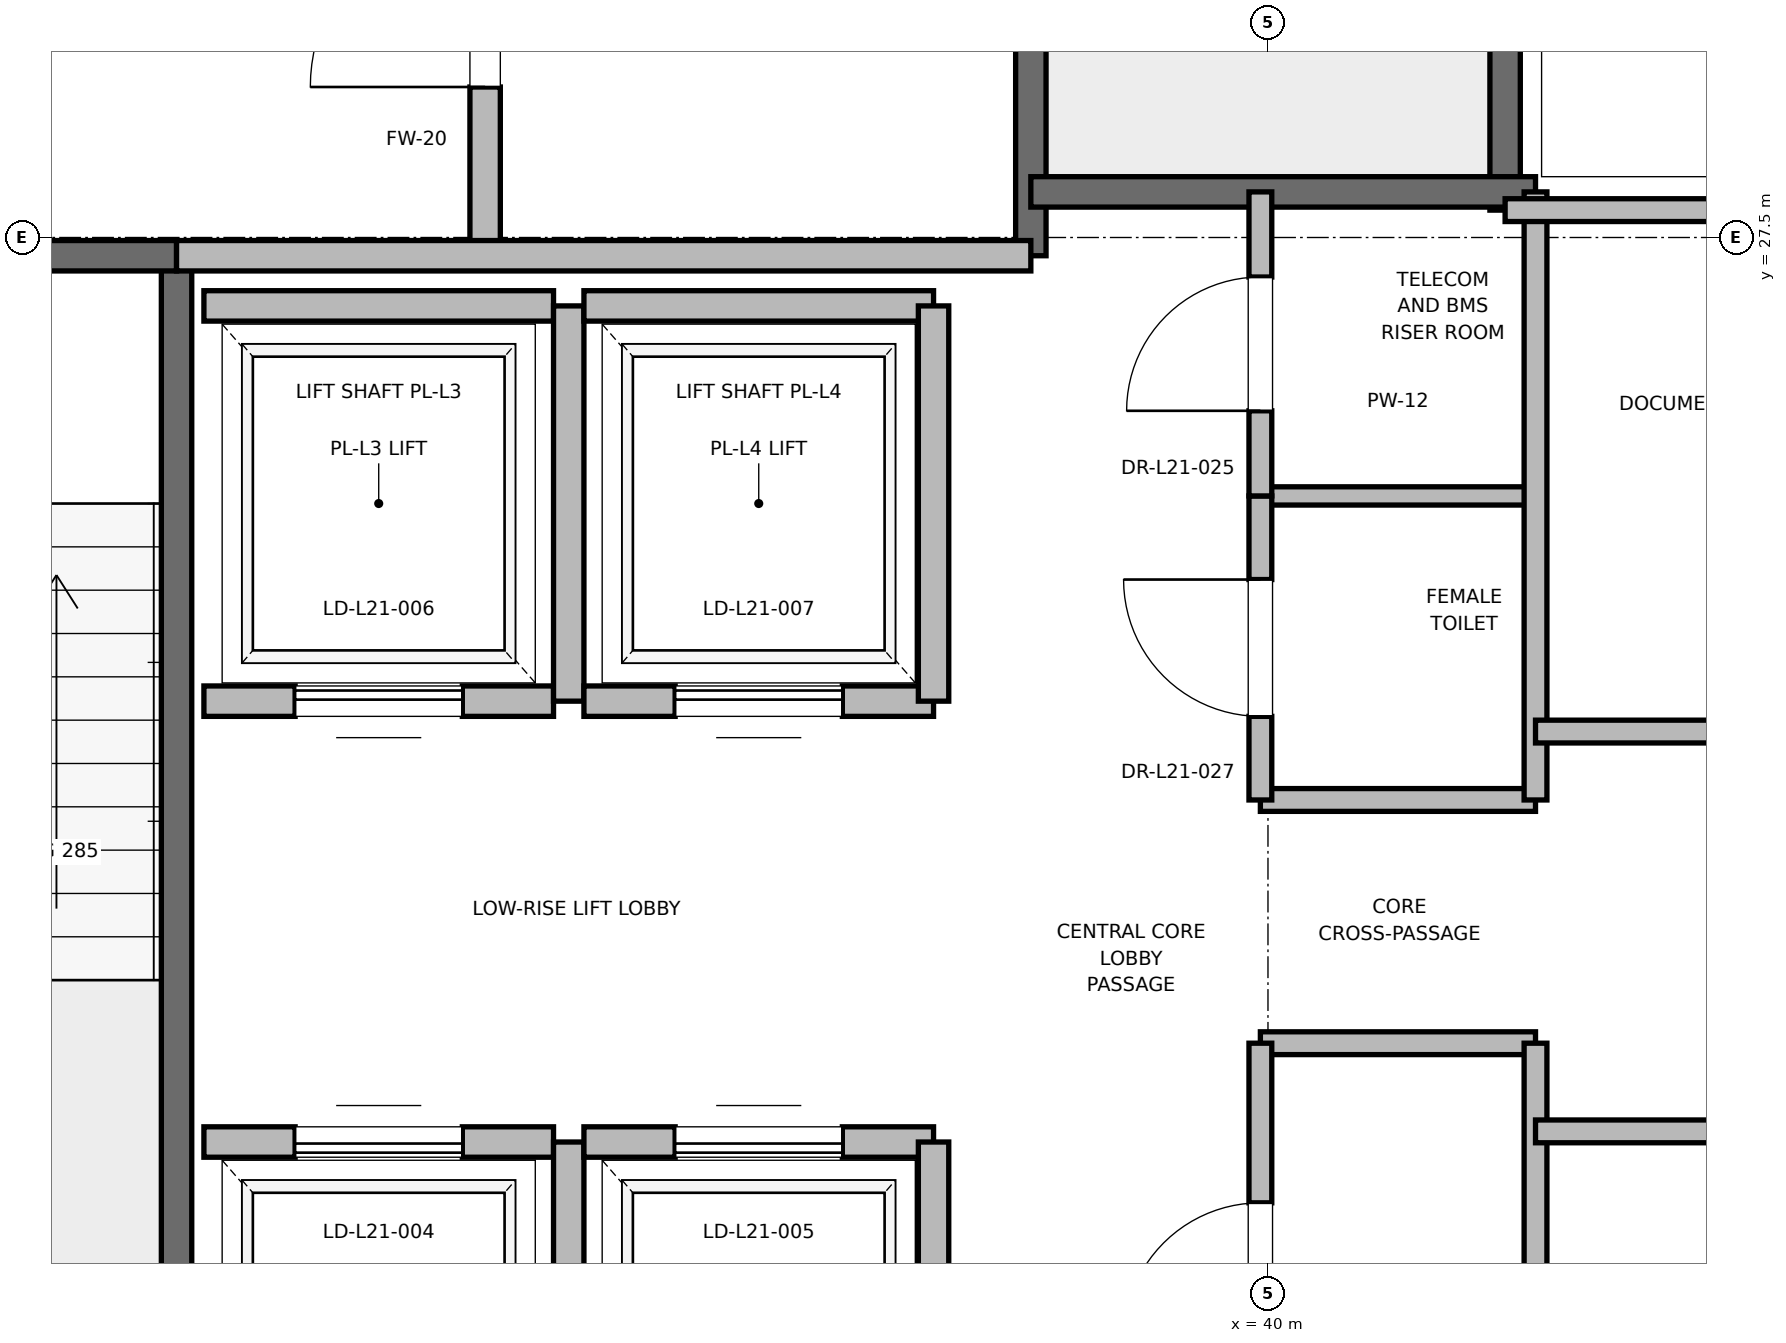
"""IFC4 building model, lengths in metres.
Left out: names, types, materials, properties, quantities, classifications, styles, units other than length and angle.
Written with IfcOpenShell. Run it as: python <this file> out.ifc"""

import sys

from ifc_helpers import new_model, si_unit, direction, frame, frame_2d, origin, place, context, subcontext, project, spatial, rectangle, extrude, element, fill, save


model = new_model("IFC4")
c1 = context("Model", 3, precision=1e-05, world=origin(), true_north=direction((0.0, 1.0)))
c2 = subcontext(c1, "Body", "Model", "MODEL_VIEW")
j1 = project(units=[si_unit("LENGTHUNIT", "METRE"), si_unit("PLANEANGLEUNIT", "RADIAN")], contexts=[c1])
p1 = place(None, origin())
s1 = spatial("IfcSite", under=j1, at=p1, CompositionType="ELEMENT")
p2 = place(p1, origin())
s2 = spatial("IfcBuilding", under=s1, at=p2, CompositionType="ELEMENT")
p3 = place(p2, frame((0.0, 0.0, 91.6)))
s3 = spatial("IfcBuildingStorey", under=s2, at=p3, CompositionType="ELEMENT", Elevation=91.6)
p4 = place(p3, frame((32.82, 18.6, 0.0), z_axis=(0.0, 0.0, 1.0), x_axis=(0.0, 1.0, 0.0)))
e1 = element("IfcWall", 1, at=p4, inside=s3, PredefinedType="SOLIDWALL", context=c2, shape_type="SweptSolid", body=[
    extrude(rectangle(XDim=8.78, YDim=0.2, at=frame_2d((4.39, 0.0))), origin(), (0.0, 0.0, 1.0), 3.76),
])
p5 = place(p3, frame((29.7, 27.38, 0.0), z_axis=(0.0, 0.0, 1.0), x_axis=(1.0, 0.0, 0.0)))
e2 = element("IfcWall", 2, at=p5, inside=s3, PredefinedType="SOLIDWALL", context=c2, shape_type="SweptSolid", body=[
    extrude(rectangle(XDim=3.12, YDim=0.2, at=frame_2d((1.56, 0.0))), origin(), (0.0, 0.0, 1.0), 3.76),
])
p6 = place(p5, frame((1.01, 0.0, 0.0)))
e3 = element("IfcOpeningElement", 3, at=p6, cuts=e2, PredefinedType="OPENING", context=c2, shape_type="SweptSolid", body=[
    extrude(rectangle(XDim=1.1, YDim=2.15, at=frame_2d((0.55, 1.075))), frame((0.0, 0.1, 0.0), z_axis=(0.0, -1.0, 0.0), x_axis=(1.0, 0.0, 0.0)), (0.0, 0.0, 1.0), 0.2),
])
p7 = place(p3, frame((38.44, 27.38, 0.0), z_axis=(0.0, 0.0, 1.0), x_axis=(0.0, 1.0, 0.0)))
e4 = element("IfcWall", 4, at=p7, inside=s3, PredefinedType="SOLIDWALL", context=c2, shape_type="SweptSolid", body=[
    extrude(rectangle(XDim=8.87, YDim=0.2, at=frame_2d((4.435, 0.0))), origin(), (0.0, 0.0, 1.0), 3.76),
])
p8 = place(p3, frame((41.56, 27.68, 0.0), z_axis=(0.0, 0.0, 1.0), x_axis=(0.0, 1.0, 0.0)))
e5 = element("IfcWall", 5, at=p8, inside=s3, PredefinedType="SOLIDWALL", context=c2, shape_type="SweptSolid", body=[
    extrude(rectangle(XDim=8.57, YDim=0.2, at=frame_2d((4.285, 0.0))), origin(), (0.0, 0.0, 1.0), 3.76),
])
p9 = place(p3, frame((38.44, 27.8, 0.0), z_axis=(0.0, 0.0, 1.0), x_axis=(1.0, 0.0, 0.0)))
e6 = element("IfcWall", 6, at=p9, inside=s3, PredefinedType="SOLIDWALL", context=c2, shape_type="SweptSolid", body=[
    extrude(rectangle(XDim=3.32, YDim=0.2, at=frame_2d((1.66, 0.0))), origin(), (0.0, 0.0, 1.0), 3.76),
])
p10 = place(p3, frame((34.85, 27.38, 0.0), z_axis=(0.0, 0.0, 1.0), x_axis=(0.0, 1.0, 0.0)))
e7 = element("IfcWall", 7, at=p10, inside=s3, PredefinedType="PARTITIONING", context=c2, shape_type="SweptSolid", body=[
    extrude(rectangle(XDim=3.37, YDim=0.2, at=frame_2d((1.685, 0.0))), origin(), (0.0, 0.0, 1.0), 3.76),
])
p11 = place(p10, frame((1.11, 0.0, 0.0)))
e8 = element("IfcOpeningElement", 8, at=p11, cuts=e7, PredefinedType="OPENING", context=c2, shape_type="SweptSolid", body=[
    extrude(rectangle(XDim=1.15, YDim=2.2, at=frame_2d((0.575, 1.1))), frame((0.0, 0.1, 0.0), z_axis=(0.0, -1.0, 0.0), x_axis=(1.0, 0.0, 0.0)), (0.0, 0.0, 1.0), 0.2),
])
p12 = place(p3, frame((32.82, 27.38, 0.0), z_axis=(0.0, 0.0, 1.0), x_axis=(1.0, 0.0, 0.0)))
e9 = element("IfcWall", 9, at=p12, inside=s3, PredefinedType="PARTITIONING", context=c2, shape_type="SweptSolid", body=[
    extrude(rectangle(XDim=5.62, YDim=0.2, at=frame_2d((2.81, 0.0))), origin(), (0.0, 0.0, 1.0), 3.76),
])
p13 = place(p3, frame((35.3, 21.55, 0.0), z_axis=(0.0, 0.0, 1.0), x_axis=(-1.0, 0.0, 0.0)))
e10 = element("IfcWall", 10, at=p13, inside=s3, PredefinedType="SOLIDWALL", context=c2, shape_type="SweptSolid", body=[
    extrude(rectangle(XDim=2.3, YDim=0.2, at=frame_2d((1.15, 0.0))), origin(), (0.0, 0.0, 1.0), 3.76),
])
p14 = place(p13, frame((0.6, 0.0, 0.0)))
e11 = element("IfcOpeningElement", 11, at=p14, cuts=e10, PredefinedType="OPENING", context=c2, shape_type="SweptSolid", body=[
    extrude(rectangle(XDim=1.1, YDim=2.2, at=frame_2d((0.55, 1.1))), frame((0.0, 0.1, 0.0), z_axis=(0.0, -1.0, 0.0), x_axis=(1.0, 0.0, 0.0)), (0.0, 0.0, 1.0), 0.2),
])
p15 = place(p3, frame((35.4, 18.95, 0.0), z_axis=(0.0, 0.0, 1.0), x_axis=(0.0, 1.0, 0.0)))
e12 = element("IfcWall", 12, at=p15, inside=s3, PredefinedType="SOLIDWALL", context=c2, shape_type="SweptSolid", body=[
    extrude(rectangle(XDim=2.6, YDim=0.2, at=frame_2d((1.3, 0.0))), origin(), (0.0, 0.0, 1.0), 3.76),
])
p16 = place(p3, frame((37.8, 21.55, 0.0), z_axis=(0.0, 0.0, 1.0), x_axis=(-1.0, 0.0, 0.0)))
e13 = element("IfcWall", 13, at=p16, inside=s3, PredefinedType="SOLIDWALL", context=c2, shape_type="SweptSolid", body=[
    extrude(rectangle(XDim=2.3, YDim=0.2, at=frame_2d((1.15, 0.0))), origin(), (0.0, 0.0, 1.0), 3.76),
])
p17 = place(p16, frame((0.6, 0.0, 0.0)))
e14 = element("IfcOpeningElement", 14, at=p17, cuts=e13, PredefinedType="OPENING", context=c2, shape_type="SweptSolid", body=[
    extrude(rectangle(XDim=1.1, YDim=2.2, at=frame_2d((0.55, 1.1))), frame((0.0, 0.1, 0.0), z_axis=(0.0, -1.0, 0.0), x_axis=(1.0, 0.0, 0.0)), (0.0, 0.0, 1.0), 0.2),
])
p18 = place(p3, frame((37.8, 18.95, 0.0), z_axis=(0.0, 0.0, 1.0), x_axis=(0.0, 1.0, 0.0)))
e15 = element("IfcWall", 15, at=p18, inside=s3, PredefinedType="SOLIDWALL", context=c2, shape_type="SweptSolid", body=[
    extrude(rectangle(XDim=2.6, YDim=0.2, at=frame_2d((1.3, 0.0))), origin(), (0.0, 0.0, 1.0), 2.54),
])
p19 = place(p3, frame((33.0, 24.45, 0.0), z_axis=(0.0, 0.0, 1.0), x_axis=(1.0, 0.0, 0.0)))
e16 = element("IfcWall", 16, at=p19, inside=s3, PredefinedType="SOLIDWALL", context=c2, shape_type="SweptSolid", body=[
    extrude(rectangle(XDim=2.3, YDim=0.2, at=frame_2d((1.15, 0.0))), origin(), (0.0, 0.0, 1.0), 3.76),
])
p20 = place(p19, frame((0.6, 0.0, 0.0)))
e17 = element("IfcOpeningElement", 17, at=p20, cuts=e16, PredefinedType="OPENING", context=c2, shape_type="SweptSolid", body=[
    extrude(rectangle(XDim=1.1, YDim=2.2, at=frame_2d((0.55, 1.1))), frame((0.0, 0.1, 0.0), z_axis=(0.0, -1.0, 0.0), x_axis=(1.0, 0.0, 0.0)), (0.0, 0.0, 1.0), 0.2),
])
p21 = place(p3, frame((35.3, 27.05, 0.0), z_axis=(0.0, 0.0, 1.0), x_axis=(-1.0, 0.0, 0.0)))
e18 = element("IfcWall", 18, at=p21, inside=s3, PredefinedType="SOLIDWALL", context=c2, shape_type="SweptSolid", body=[
    extrude(rectangle(XDim=2.3, YDim=0.2, at=frame_2d((1.15, 0.0))), origin(), (0.0, 0.0, 1.0), 3.76),
])
p22 = place(p3, frame((35.4, 24.45, 0.0), z_axis=(0.0, 0.0, 1.0), x_axis=(0.0, 1.0, 0.0)))
e19 = element("IfcWall", 19, at=p22, inside=s3, PredefinedType="SOLIDWALL", context=c2, shape_type="SweptSolid", body=[
    extrude(rectangle(XDim=2.6, YDim=0.2, at=frame_2d((1.3, 0.0))), origin(), (0.0, 0.0, 1.0), 3.76),
])
p23 = place(p3, frame((35.5, 24.45, 0.0), z_axis=(0.0, 0.0, 1.0), x_axis=(1.0, 0.0, 0.0)))
e20 = element("IfcWall", 20, at=p23, inside=s3, PredefinedType="SOLIDWALL", context=c2, shape_type="SweptSolid", body=[
    extrude(rectangle(XDim=2.3, YDim=0.2, at=frame_2d((1.15, 0.0))), origin(), (0.0, 0.0, 1.0), 3.76),
])
p24 = place(p23, frame((0.6, 0.0, 0.0)))
e21 = element("IfcOpeningElement", 21, at=p24, cuts=e20, PredefinedType="OPENING", context=c2, shape_type="SweptSolid", body=[
    extrude(rectangle(XDim=1.1, YDim=2.2, at=frame_2d((0.55, 1.1))), frame((0.0, 0.1, 0.0), z_axis=(0.0, -1.0, 0.0), x_axis=(1.0, 0.0, 0.0)), (0.0, 0.0, 1.0), 0.2),
])
p25 = place(p3, frame((37.8, 27.05, 0.0), z_axis=(0.0, 0.0, 1.0), x_axis=(-1.0, 0.0, 0.0)))
e22 = element("IfcWall", 22, at=p25, inside=s3, PredefinedType="SOLIDWALL", context=c2, shape_type="SweptSolid", body=[
    extrude(rectangle(XDim=2.3, YDim=0.2, at=frame_2d((1.15, 0.0))), origin(), (0.0, 0.0, 1.0), 3.76),
])
p26 = place(p3, frame((37.8, 24.45, 0.0), z_axis=(0.0, 0.0, 1.0), x_axis=(0.0, 1.0, 0.0)))
e23 = element("IfcWall", 23, at=p26, inside=s3, PredefinedType="SOLIDWALL", context=c2, shape_type="SweptSolid", body=[
    extrude(rectangle(XDim=2.6, YDim=0.2, at=frame_2d((1.3, 0.0))), origin(), (0.0, 0.0, 1.0), 3.76),
])
for number, where, z_axis, x_axis in (
    (24, (39.95, 22.2, 0.0), (0.0, 0.0, 1.0), (1.0, 0.0, 0.0)),
    (25, (39.95, 23.8, 0.0), (0.0, 0.0, 1.0), (1.0, 0.0, 0.0)),
):
    element("IfcWall", number, at=place(p3, frame(where, z_axis=z_axis, x_axis=x_axis)), inside=s3, PredefinedType="PARTITIONING", context=c2, shape_type="SweptSolid", body=[
        extrude(rectangle(XDim=1.81, YDim=0.15, at=frame_2d((0.905, 0.0))), origin(), (0.0, 0.0, 1.0), 2.85),
    ])
p27 = place(p3, frame((39.95, 25.8, 0.0), z_axis=(0.0, 0.0, 1.0), x_axis=(1.0, 0.0, 0.0)))
e26 = element("IfcWall", 26, at=p27, inside=s3, PredefinedType="PARTITIONING", context=c2, shape_type="SweptSolid", body=[
    extrude(rectangle(XDim=1.81, YDim=0.12, at=frame_2d((0.905, 0.0))), origin(), (0.0, 0.0, 1.0), 2.85),
])
p28 = place(p3, frame((41.76, 18.6, 0.0), z_axis=(0.0, 0.0, 1.0), x_axis=(0.0, 1.0, 0.0)))
e27 = element("IfcWall", 27, at=p28, inside=s3, PredefinedType="PARTITIONING", context=c2, shape_type="SweptSolid", body=[
    extrude(rectangle(XDim=3.6, YDim=0.15, at=frame_2d((1.8, 0.0))), origin(), (0.0, 0.0, 1.0), 2.54),
])
p29 = place(p3, frame((41.76, 23.8, 0.0), z_axis=(0.0, 0.0, 1.0), x_axis=(0.0, 1.0, 0.0)))
e28 = element("IfcWall", 28, at=p29, inside=s3, PredefinedType="PARTITIONING", context=c2, shape_type="SweptSolid", body=[
    extrude(rectangle(XDim=4.0, YDim=0.15, at=frame_2d((2.0, 0.0))), origin(), (0.0, 0.0, 1.0), 2.85),
])
p30 = place(p3, frame((39.95, 19.2, 0.0), z_axis=(0.0, 0.0, 1.0), x_axis=(0.0, 1.0, 0.0)))
e29 = element("IfcWall", 29, at=p30, inside=s3, PredefinedType="PARTITIONING", context=c2, shape_type="SweptSolid", body=[
    extrude(rectangle(XDim=3.0, YDim=0.15, at=frame_2d((1.5, 0.0))), origin(), (0.0, 0.0, 1.0), 2.85),
])
p31 = place(p30, frame((1.05, 0.0, 0.0)))
e30 = element("IfcOpeningElement", 30, at=p31, cuts=e29, PredefinedType="OPENING", context=c2, shape_type="SweptSolid", body=[
    extrude(rectangle(XDim=0.9, YDim=2.1, at=frame_2d((0.45, 1.05))), frame((0.0, 0.075, 0.0), z_axis=(0.0, -1.0, 0.0), x_axis=(1.0, 0.0, 0.0)), (0.0, 0.0, 1.0), 0.15),
])
p32 = place(p3, frame((39.95, 23.8, 0.0), z_axis=(0.0, 0.0, 1.0), x_axis=(0.0, 1.0, 0.0)))
e31 = element("IfcWall", 31, at=p32, inside=s3, PredefinedType="PARTITIONING", context=c2, shape_type="SweptSolid", body=[
    extrude(rectangle(XDim=2.0, YDim=0.15, at=frame_2d((1.0, 0.0))), origin(), (0.0, 0.0, 1.0), 2.85),
])
p33 = place(p32, frame((0.55, 0.0, 0.0)))
e32 = element("IfcOpeningElement", 32, at=p33, cuts=e31, PredefinedType="OPENING", context=c2, shape_type="SweptSolid", body=[
    extrude(rectangle(XDim=0.9, YDim=2.1, at=frame_2d((0.45, 1.05))), frame((0.0, 0.075, 0.0), z_axis=(0.0, -1.0, 0.0), x_axis=(1.0, 0.0, 0.0)), (0.0, 0.0, 1.0), 0.15),
])
p34 = place(p3, frame((39.95, 25.8, 0.0), z_axis=(0.0, 0.0, 1.0), x_axis=(0.0, 1.0, 0.0)))
e33 = element("IfcWall", 33, at=p34, inside=s3, PredefinedType="PARTITIONING", context=c2, shape_type="SweptSolid", body=[
    extrude(rectangle(XDim=2.0, YDim=0.15, at=frame_2d((1.0, 0.0))), origin(), (0.0, 0.0, 1.0), 2.85),
])
p35 = place(p34, frame((0.56, 0.0, 0.0)))
e34 = element("IfcOpeningElement", 34, at=p35, cuts=e33, PredefinedType="OPENING", context=c2, shape_type="SweptSolid", body=[
    extrude(rectangle(XDim=0.88, YDim=2.1, at=frame_2d((0.44, 1.05))), frame((0.0, 0.075, 0.0), z_axis=(0.0, -1.0, 0.0), x_axis=(1.0, 0.0, 0.0)), (0.0, 0.0, 1.0), 0.15),
])
p36 = place(p3, frame((41.56, 27.68, 0.0), z_axis=(0.0, 0.0, 1.0), x_axis=(1.0, 0.0, 0.0)))
e35 = element("IfcWall", 35, at=p36, inside=s3, PredefinedType="PARTITIONING", context=c2, shape_type="SweptSolid", body=[
    extrude(rectangle(XDim=3.59, YDim=0.15, at=frame_2d((1.795, 0.0))), origin(), (0.0, 0.0, 1.0), 2.85),
])
p37 = place(p3, frame((41.76, 21.62, 0.0), z_axis=(0.0, 0.0, 1.0), x_axis=(1.0, 0.0, 0.0)))
e36 = element("IfcWall", 36, at=p37, inside=s3, PredefinedType="PARTITIONING", context=c2, shape_type="SweptSolid", body=[
    extrude(rectangle(XDim=5.98, YDim=0.15, at=frame_2d((2.99, 0.0))), origin(), (0.0, 0.0, 1.0), 2.85),
])
p38 = place(p37, frame((2.49, 0.0, 0.0)))
e37 = element("IfcOpeningElement", 37, at=p38, cuts=e36, PredefinedType="OPENING", context=c2, shape_type="SweptSolid", body=[
    extrude(rectangle(XDim=1.0, YDim=2.15, at=frame_2d((0.5, 1.075))), frame((0.0, 0.075, 0.0), z_axis=(0.0, -1.0, 0.0), x_axis=(1.0, 0.0, 0.0)), (0.0, 0.0, 1.0), 0.15),
])
p39 = place(p3, frame((41.76, 24.25, 0.0), z_axis=(0.0, 0.0, 1.0), x_axis=(1.0, 0.0, 0.0)))
e38 = element("IfcWall", 38, at=p39, inside=s3, PredefinedType="PARTITIONING", context=c2, shape_type="SweptSolid", body=[
    extrude(rectangle(XDim=3.39, YDim=0.15, at=frame_2d((1.695, 0.0))), origin(), (0.0, 0.0, 1.0), 2.85),
])
p40 = place(p39, frame((1.195, 0.0, 0.0)))
e39 = element("IfcOpeningElement", 39, at=p40, cuts=e38, PredefinedType="OPENING", context=c2, shape_type="SweptSolid", body=[
    extrude(rectangle(XDim=1.0, YDim=2.15, at=frame_2d((0.5, 1.075))), frame((0.0, 0.075, 0.0), z_axis=(0.0, -1.0, 0.0), x_axis=(1.0, 0.0, 0.0)), (0.0, 0.0, 1.0), 0.15),
])
p41 = place(p11, origin())
e40 = element("IfcDoor", 40, at=p41, inside=s3, OperationType="SINGLE_SWING_LEFT", PredefinedType="DOOR", context=c2, shape_type="SweptSolid", body=[
    extrude(rectangle(XDim=1.15, YDim=2.2, at=frame_2d((0.575, 1.1))), frame((0.0, 0.025, 0.0), z_axis=(0.0, -1.0, 0.0), x_axis=(1.0, 0.0, 0.0)), (0.0, 0.0, 1.0), 0.05),
])
fill(e8, e40)
p42 = place(p14, origin())
e41 = element("IfcDoor", 41, at=p42, inside=s3, OperationType="SLIDING_TO_RIGHT", PredefinedType="DOOR", context=c2, shape_type="SweptSolid", body=[
    extrude(rectangle(XDim=1.1, YDim=2.2, at=frame_2d((0.55, 1.1))), frame((0.0, 0.025, 0.0), z_axis=(0.0, -1.0, 0.0), x_axis=(1.0, 0.0, 0.0)), (0.0, 0.0, 1.0), 0.05),
])
fill(e11, e41)
p43 = place(p17, origin())
e42 = element("IfcDoor", 42, at=p43, inside=s3, OperationType="SLIDING_TO_RIGHT", PredefinedType="DOOR", context=c2, shape_type="SweptSolid", body=[
    extrude(rectangle(XDim=1.1, YDim=2.2, at=frame_2d((0.55, 1.1))), frame((0.0, 0.025, 0.0), z_axis=(0.0, -1.0, 0.0), x_axis=(1.0, 0.0, 0.0)), (0.0, 0.0, 1.0), 0.05),
])
fill(e14, e42)
p44 = place(p20, origin())
e43 = element("IfcDoor", 43, at=p44, inside=s3, OperationType="SLIDING_TO_RIGHT", PredefinedType="DOOR", context=c2, shape_type="SweptSolid", body=[
    extrude(rectangle(XDim=1.1, YDim=2.2, at=frame_2d((0.55, 1.1))), frame((0.0, 0.025, 0.0), z_axis=(0.0, -1.0, 0.0), x_axis=(1.0, 0.0, 0.0)), (0.0, 0.0, 1.0), 0.05),
])
fill(e17, e43)
p45 = place(p24, origin())
e44 = element("IfcDoor", 44, at=p45, inside=s3, OperationType="SLIDING_TO_RIGHT", PredefinedType="DOOR", context=c2, shape_type="SweptSolid", body=[
    extrude(rectangle(XDim=1.1, YDim=2.2, at=frame_2d((0.55, 1.1))), frame((0.0, 0.025, 0.0), z_axis=(0.0, -1.0, 0.0), x_axis=(1.0, 0.0, 0.0)), (0.0, 0.0, 1.0), 0.05),
])
fill(e21, e44)
p46 = place(p31, origin())
e45 = element("IfcDoor", 45, at=p46, inside=s3, OperationType="SINGLE_SWING_LEFT", PredefinedType="DOOR", context=c2, shape_type="SweptSolid", body=[
    extrude(rectangle(XDim=0.9, YDim=2.1, at=frame_2d((0.45, 1.05))), frame((0.0, 0.025, 0.0), z_axis=(0.0, -1.0, 0.0), x_axis=(1.0, 0.0, 0.0)), (0.0, 0.0, 1.0), 0.05),
])
fill(e30, e45)
p47 = place(p33, origin())
e46 = element("IfcDoor", 46, at=p47, inside=s3, OperationType="SINGLE_SWING_RIGHT", PredefinedType="DOOR", context=c2, shape_type="SweptSolid", body=[
    extrude(rectangle(XDim=0.9, YDim=2.1, at=frame_2d((0.45, 1.05))), frame((0.0, 0.025, 0.0), z_axis=(0.0, -1.0, 0.0), x_axis=(1.0, 0.0, 0.0)), (0.0, 0.0, 1.0), 0.05),
])
fill(e32, e46)
p48 = place(p35, origin())
e47 = element("IfcDoor", 47, at=p48, inside=s3, OperationType="SINGLE_SWING_LEFT", PredefinedType="DOOR", context=c2, shape_type="SweptSolid", body=[
    extrude(rectangle(XDim=0.88, YDim=2.1, at=frame_2d((0.44, 1.05))), frame((0.0, 0.025, 0.0), z_axis=(0.0, -1.0, 0.0), x_axis=(1.0, 0.0, 0.0)), (0.0, 0.0, 1.0), 0.05),
])
fill(e34, e47)
save(model, sys.argv[1])
